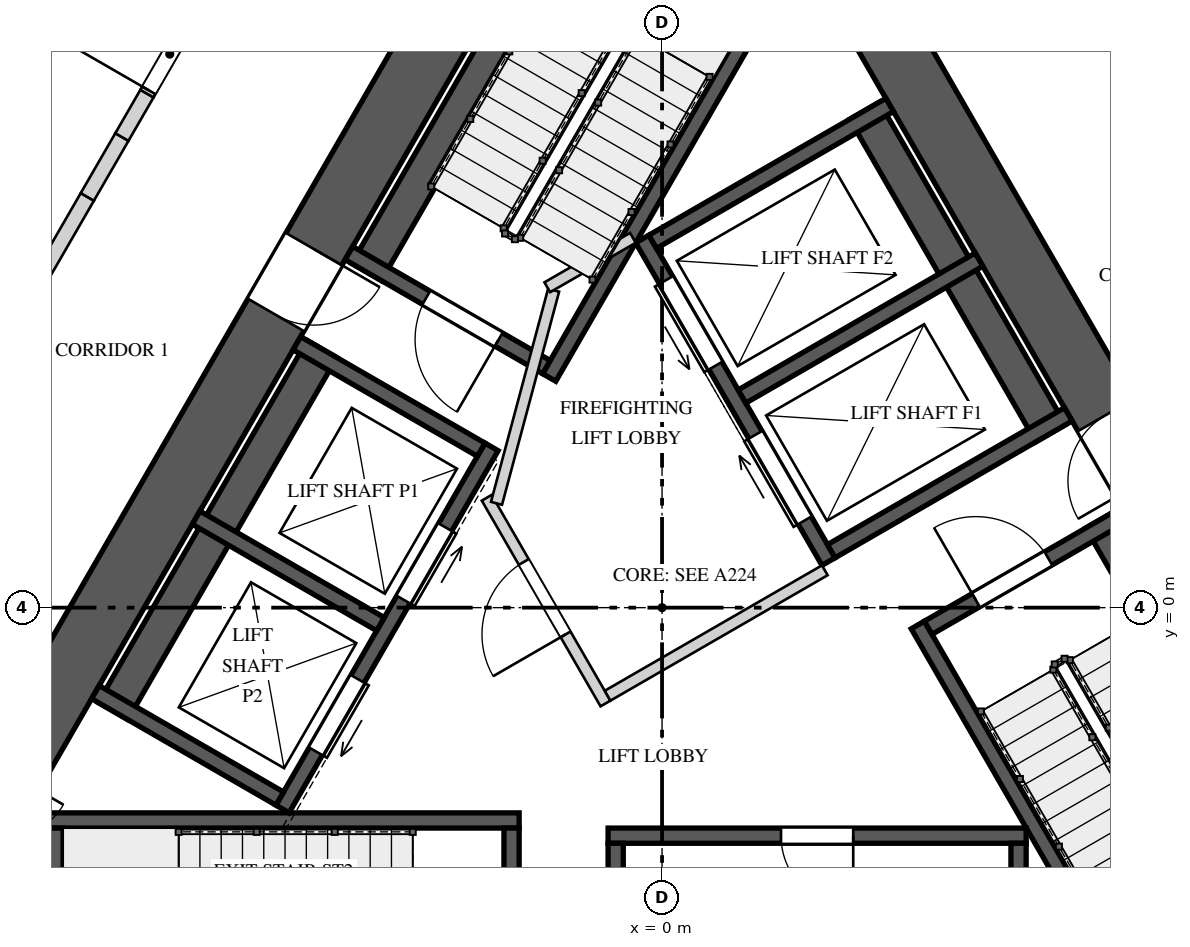
"""IFC4 building model, lengths in metres.
Left out: names, types, materials, properties, quantities, classifications, styles, units other than length and angle.
Written with IfcOpenShell. Run it as: python <this file> out.ifc"""

import sys

from ifc_helpers import new_model, si_unit, direction, frame, frame_2d, origin, place, context, subcontext, project, spatial, polyline, rectangle, outline, extrude, element, fill, save


model = new_model("IFC4")
c1 = context("Model", 3, precision=1e-05, world=origin(), true_north=direction((0.0, 1.0)))
c2 = subcontext(c1, "Body", "Model", "MODEL_VIEW")
j1 = project(units=[si_unit("LENGTHUNIT", "METRE"), si_unit("PLANEANGLEUNIT", "RADIAN")], contexts=[c1])
p1 = place(None, origin())
s1 = spatial("IfcSite", under=j1, at=p1, CompositionType="ELEMENT")
p2 = place(p1, origin())
s2 = spatial("IfcBuilding", under=s1, at=p2, CompositionType="ELEMENT")
p3 = place(p2, frame((0.0, 0.0, 162.8)))
s3 = spatial("IfcBuildingStorey", under=s2, at=p3, CompositionType="ELEMENT", Elevation=162.8)
p4 = place(p3, frame((-1.198, 10.575, 0.0), z_axis=(0.0, 0.0, 1.0), x_axis=(-0.499995289315, -0.866028123483, 0.0)))
e1 = element("IfcWall", 1, at=p4, inside=s3, PredefinedType="SHEAR", context=c2, shape_type="SweptSolid", body=[
    extrude(rectangle(XDim=17.118, YDim=0.85, at=frame_2d((8.559, 0.0))), origin(), (0.0, 0.0, 1.0), 4.0),
])
p5 = place(p4, frame((6.764, 0.0, 0.0)))
e2 = element("IfcOpeningElement", 2, at=p5, cuts=e1, PredefinedType="OPENING", context=c2, shape_type="SweptSolid", body=[
    extrude(rectangle(XDim=1.0, YDim=2.4, at=frame_2d((0.5, 1.2))), frame((0.0, 0.435, 0.0), z_axis=(0.0, -1.0, 0.0), x_axis=(1.0, 0.0, 0.0)), (0.0, 0.0, 1.0), 0.87),
])
p6 = place(p4, frame((14.742, 0.0, 0.0)))
e3 = element("IfcOpeningElement", 3, at=p6, cuts=e1, PredefinedType="OPENING", context=c2, shape_type="SweptSolid", body=[
    extrude(rectangle(XDim=0.8, YDim=2.1, at=frame_2d((0.4, 1.05))), frame((0.0, 0.435, 0.0), z_axis=(0.0, -1.0, 0.0), x_axis=(1.0, 0.0, 0.0)), (0.0, 0.0, 1.0), 0.87),
])
p7 = place(p3, frame((9.757, -4.25, 0.0), z_axis=(0.0, 0.0, 1.0), x_axis=(-0.499995289315, 0.866028123483, 0.0)))
e4 = element("IfcWall", 4, at=p7, inside=s3, PredefinedType="SHEAR", context=c2, shape_type="SweptSolid", body=[
    extrude(rectangle(XDim=17.118, YDim=0.85, at=frame_2d((8.559, 0.0))), origin(), (0.0, 0.0, 1.0), 4.0),
])
p8 = place(p7, frame((6.834, 0.0, 0.0)))
e5 = element("IfcOpeningElement", 5, at=p8, cuts=e4, PredefinedType="OPENING", context=c2, shape_type="SweptSolid", body=[
    extrude(rectangle(XDim=1.0, YDim=2.4, at=frame_2d((0.5, 1.2))), frame((0.0, 0.435, 0.0), z_axis=(0.0, -1.0, 0.0), x_axis=(1.0, 0.0, 0.0)), (0.0, 0.0, 1.0), 0.87),
])
p9 = place(p3, frame((-0.788, 9.785, 0.0), z_axis=(0.0, 0.0, 1.0), x_axis=(-0.500009909098, -0.866019682689, 0.0)))
e6 = element("IfcWall", 6, at=p9, inside=s3, PredefinedType="SOLIDWALL", context=c2, shape_type="SweptSolid", body=[
    extrude(rectangle(XDim=6.2, YDim=0.45, at=frame_2d((3.1, 0.0))), origin(), (0.0, 0.0, 1.0), 3.65),
])
p10 = place(p3, frame((1.79, 8.7, 0.0), z_axis=(0.0, 0.0, 1.0), x_axis=(-0.499999959354, -0.866025427251, 0.0)))
e7 = element("IfcWall", 7, at=p10, inside=s3, PredefinedType="SOLIDWALL", context=c2, shape_type="SweptSolid", body=[
    extrude(rectangle(XDim=6.549, YDim=0.2, at=frame_2d((3.275, 0.0))), origin(), (0.0, 0.0, 1.0), 3.65),
])
p11 = place(p3, frame((-1.521, 3.165, 0.0), z_axis=(0.0, 0.0, 1.0), x_axis=(-0.866031096941, 0.499990139034, 0.0)))
e8 = element("IfcWall", 8, at=p11, inside=s3, PredefinedType="SOLIDWALL", context=c2, shape_type="SweptSolid", body=[
    extrude(rectangle(XDim=3.0, YDim=0.2, at=frame_2d((1.5, 0.0))), origin(), (0.0, 0.0, 1.0), 3.65),
])
p12 = place(p11, frame((0.725, 0.0, 0.0)))
e9 = element("IfcOpeningElement", 9, at=p12, cuts=e8, PredefinedType="OPENING", context=c2, shape_type="SweptSolid", body=[
    extrude(rectangle(XDim=1.1, YDim=2.4, at=frame_2d((0.55, 1.2))), frame((0.0, 0.11, 0.0), z_axis=(0.0, -1.0, 0.0), x_axis=(1.0, 0.0, 0.0)), (0.0, 0.0, 1.0), 0.22),
])
p13 = place(p3, frame((-8.429, -2.8, 0.0), z_axis=(0.0, 0.0, 1.0), x_axis=(1.0, 0.0, 0.0)))
e10 = element("IfcWall", 10, at=p13, inside=s3, PredefinedType="SOLIDWALL", context=c2, shape_type="SweptSolid", body=[
    extrude(rectangle(XDim=6.549, YDim=0.2, at=frame_2d((3.275, 0.0))), origin(), (0.0, 0.0, 1.0), 3.65),
])
p14 = place(p3, frame((-7.98, -2.9, 0.0), z_axis=(0.0, 0.0, 1.0), x_axis=(0.0, -1.0, 0.0)))
e11 = element("IfcWall", 11, at=p14, inside=s3, PredefinedType="SOLIDWALL", context=c2, shape_type="SweptSolid", body=[
    extrude(rectangle(XDim=3.0, YDim=0.2, at=frame_2d((1.5, 0.0))), origin(), (0.0, 0.0, 1.0), 3.65),
])
p15 = place(p3, frame((-1.98, -2.9, 0.0), z_axis=(0.0, 0.0, 1.0), x_axis=(0.0, -1.0, 0.0)))
e12 = element("IfcWall", 12, at=p15, inside=s3, PredefinedType="SOLIDWALL", context=c2, shape_type="SweptSolid", body=[
    extrude(rectangle(XDim=3.0, YDim=0.2, at=frame_2d((1.5, 0.0))), origin(), (0.0, 0.0, 1.0), 3.65),
])
p16 = place(p15, frame((0.725, 0.0, 0.0)))
e13 = element("IfcOpeningElement", 13, at=p16, cuts=e12, PredefinedType="OPENING", context=c2, shape_type="SweptSolid", body=[
    extrude(rectangle(XDim=1.1, YDim=2.4, at=frame_2d((0.55, 1.2))), frame((0.0, 0.11, 0.0), z_axis=(0.0, -1.0, 0.0), x_axis=(1.0, 0.0, 0.0)), (0.0, 0.0, 1.0), 0.22),
])
p17 = place(p3, frame((8.868, -4.21, 0.0), z_axis=(0.0, 0.0, 1.0), x_axis=(-0.500009909098, 0.866019682689, 0.0)))
e14 = element("IfcWall", 14, at=p17, inside=s3, PredefinedType="SOLIDWALL", context=c2, shape_type="SweptSolid", body=[
    extrude(rectangle(XDim=6.2, YDim=0.45, at=frame_2d((3.1, 0.0))), origin(), (0.0, 0.0, 1.0), 3.65),
])
p18 = place(p3, frame((6.64, -5.9, 0.0), z_axis=(0.0, 0.0, 1.0), x_axis=(-0.499999959354, 0.866025427251, 0.0)))
e15 = element("IfcWall", 15, at=p18, inside=s3, PredefinedType="SOLIDWALL", context=c2, shape_type="SweptSolid", body=[
    extrude(rectangle(XDim=6.549, YDim=0.2, at=frame_2d((3.275, 0.0))), origin(), (0.0, 0.0, 1.0), 3.65),
])
p19 = place(p3, frame((3.501, -0.265, 0.0), z_axis=(0.0, 0.0, 1.0), x_axis=(0.866031096941, 0.499990139034, 0.0)))
e16 = element("IfcWall", 16, at=p19, inside=s3, PredefinedType="SOLIDWALL", context=c2, shape_type="SweptSolid", body=[
    extrude(rectangle(XDim=3.0, YDim=0.2, at=frame_2d((1.5, 0.0))), origin(), (0.0, 0.0, 1.0), 3.65),
])
p20 = place(p19, frame((0.725, 0.0, 0.0)))
e17 = element("IfcOpeningElement", 17, at=p20, cuts=e16, PredefinedType="OPENING", context=c2, shape_type="SweptSolid", body=[
    extrude(rectangle(XDim=1.1, YDim=2.4, at=frame_2d((0.55, 1.2))), frame((0.0, 0.11, 0.0), z_axis=(0.0, -1.0, 0.0), x_axis=(1.0, 0.0, 0.0)), (0.0, 0.0, 1.0), 0.22),
])
p21 = place(p3, frame((-2.243, 2.115, 0.0), z_axis=(0.0, 0.0, 1.0), x_axis=(-0.499996545922, -0.866027397988, 0.0)))
e18 = element("IfcWall", 18, at=p21, inside=s3, PredefinedType="SOLIDWALL", context=c2, shape_type="SweptSolid", body=[
    extrude(rectangle(XDim=5.5, YDim=0.2, at=frame_2d((2.75, 0.0))), origin(), (0.0, 0.0, 1.0), 3.65),
])
p22 = place(p21, frame((1.22, 0.0, 0.0)))
e19 = element("IfcOpeningElement", 19, at=p22, cuts=e18, PredefinedType="OPENING", context=c2, shape_type="SweptSolid", body=[
    extrude(rectangle(XDim=1.1, YDim=2.1, at=frame_2d((0.55, 1.05))), frame((0.0, 0.11, 0.0), z_axis=(0.0, -1.0, 0.0), x_axis=(1.0, 0.0, 0.0)), (0.0, 0.0, 1.0), 0.22),
])
p23 = place(p21, frame((3.525, 0.0, 0.0)))
e20 = element("IfcOpeningElement", 20, at=p23, cuts=e18, PredefinedType="OPENING", context=c2, shape_type="SweptSolid", body=[
    extrude(rectangle(XDim=1.1, YDim=2.1, at=frame_2d((0.55, 1.05))), frame((0.0, 0.11, 0.0), z_axis=(0.0, -1.0, 0.0), x_axis=(1.0, 0.0, 0.0)), (0.0, 0.0, 1.0), 0.22),
])
p24 = place(p3, frame((-4.473, 3.402, 0.0), z_axis=(0.0, 0.0, 1.0), x_axis=(-0.499996545922, -0.866027397988, 0.0)))
e21 = element("IfcWall", 21, at=p24, inside=s3, PredefinedType="SOLIDWALL", context=c2, shape_type="SweptSolid", body=[
    extrude(rectangle(XDim=5.5, YDim=0.45, at=frame_2d((2.75, 0.0))), origin(), (0.0, 0.0, 1.0), 3.65),
])
p25 = place(p3, frame((-2.38, 2.078, 0.0), z_axis=(0.0, 0.0, 1.0), x_axis=(-0.866034573852, 0.49998411664, 0.0)))
e22 = element("IfcWall", 22, at=p25, inside=s3, PredefinedType="SOLIDWALL", context=c2, shape_type="SweptSolid", body=[
    extrude(rectangle(XDim=2.8, YDim=0.2, at=frame_2d((1.4, 0.0))), origin(), (0.0, 0.0, 1.0), 3.65),
])
p26 = place(p3, frame((-3.705, -0.217, 0.0), z_axis=(0.0, 0.0, 1.0), x_axis=(-0.866018616679, 0.500011755427, 0.0)))
e23 = element("IfcWall", 23, at=p26, inside=s3, PredefinedType="SOLIDWALL", context=c2, shape_type="SweptSolid", body=[
    extrude(rectangle(XDim=2.8, YDim=0.2, at=frame_2d((1.4, 0.0))), origin(), (0.0, 0.0, 1.0), 3.65),
])
p27 = place(p3, frame((-5.03, -2.512, 0.0), z_axis=(0.0, 0.0, 1.0), x_axis=(-0.865996816683, 0.500049511043, 0.0)))
e24 = element("IfcWall", 24, at=p27, inside=s3, PredefinedType="SOLIDWALL", context=c2, shape_type="SweptSolid", body=[
    extrude(rectangle(XDim=2.8, YDim=0.2, at=frame_2d((1.4, 0.0))), origin(), (0.0, 0.0, 1.0), 3.65),
])
p28 = place(p3, frame((4.79, -3.0, 0.0), z_axis=(0.0, 0.0, 1.0), x_axis=(-1.0, 0.0, 0.0)))
e25 = element("IfcWall", 25, at=p28, inside=s3, PredefinedType="SOLIDWALL", context=c2, shape_type="SweptSolid", body=[
    extrude(rectangle(XDim=5.5, YDim=0.2, at=frame_2d((2.75, 0.0))), origin(), (0.0, 0.0, 1.0), 3.65),
])
p29 = place(p28, frame((2.275, 0.0, 0.0)))
e26 = element("IfcOpeningElement", 26, at=p29, cuts=e25, PredefinedType="OPENING", context=c2, shape_type="SweptSolid", body=[
    extrude(rectangle(XDim=0.95, YDim=2.4, at=frame_2d((0.475, 1.2))), frame((0.0, 0.11, 0.0), z_axis=(0.0, -1.0, 0.0), x_axis=(1.0, 0.0, 0.0)), (0.0, 0.0, 1.0), 0.22),
])
for number, where, z_axis, x_axis in (
    (27, (-0.61, -3.1, 0.0), (0.0, 0.0, 1.0), (0.0, -1.0, 0.0)),
    (28, (4.69, -3.1, 0.0), (0.0, 0.0, 1.0), (0.0, -1.0, 0.0)),
):
    element("IfcWall", number, at=place(p3, frame(where, z_axis=z_axis, x_axis=x_axis)), inside=s3, PredefinedType="SOLIDWALL", context=c2, shape_type="SweptSolid", body=[
        extrude(rectangle(XDim=2.8, YDim=0.2, at=frame_2d((1.4, 0.0))), origin(), (0.0, 0.0, 1.0), 3.65),
    ])
p30 = place(p3, frame((2.19, 0.606, 0.0), z_axis=(0.0, 0.0, 1.0), x_axis=(-0.500002801628, 0.866023786258, 0.0)))
e29 = element("IfcWall", 29, at=p30, inside=s3, PredefinedType="SOLIDWALL", context=c2, shape_type="SweptSolid", body=[
    extrude(rectangle(XDim=4.9, YDim=0.2, at=frame_2d((2.45, 0.0))), origin(), (0.0, 0.0, 1.0), 3.65),
])
p31 = place(p30, frame((0.625, 0.0, 0.0)))
e30 = element("IfcOpeningElement", 30, at=p31, cuts=e29, PredefinedType="OPENING", context=c2, shape_type="SweptSolid", body=[
    extrude(rectangle(XDim=1.3, YDim=2.1, at=frame_2d((0.65, 1.05))), frame((0.0, 0.11, 0.0), z_axis=(0.0, -1.0, 0.0), x_axis=(1.0, 0.0, 0.0)), (0.0, 0.0, 1.0), 0.22),
])
p32 = place(p30, frame((2.975, 0.0, 0.0)))
e31 = element("IfcOpeningElement", 31, at=p32, cuts=e29, PredefinedType="OPENING", context=c2, shape_type="SweptSolid", body=[
    extrude(rectangle(XDim=1.3, YDim=2.1, at=frame_2d((0.65, 1.05))), frame((0.0, 0.11, 0.0), z_axis=(0.0, -1.0, 0.0), x_axis=(1.0, 0.0, 0.0)), (0.0, 0.0, 1.0), 0.22),
])
p33 = place(p3, frame((5.113, 2.294, 0.0), z_axis=(0.0, 0.0, 1.0), x_axis=(-0.500002801628, 0.866023786258, 0.0)))
e32 = element("IfcWall", 32, at=p33, inside=s3, PredefinedType="SOLIDWALL", context=c2, shape_type="SweptSolid", body=[
    extrude(rectangle(XDim=4.9, YDim=0.45, at=frame_2d((2.45, 0.0))), origin(), (0.0, 0.0, 1.0), 3.65),
])
for number, where, z_axis, x_axis in (
    (33, (2.227, 0.743, 0.0), (0.0, 0.0, 1.0), (0.866, 0.5, 0.0)),
    (34, (1.052, 2.778, 0.0), (0.0, 0.0, 1.0), (0.866, 0.5, 0.0)),
    (35, (-0.123, 4.813, 0.0), (0.0, 0.0, 1.0), (0.866, 0.5, 0.0)),
):
    element("IfcWall", number, at=place(p3, frame(where, z_axis=z_axis, x_axis=x_axis)), inside=s3, PredefinedType="SOLIDWALL", context=c2, shape_type="SweptSolid", body=[
        extrude(rectangle(XDim=3.6, YDim=0.2, at=frame_2d((1.8, 0.0))), origin(), (0.0, 0.0, 1.0), 3.65),
    ])
p34 = place(p3, frame((-0.744, -1.261, 0.0), z_axis=(0.0, 0.0, 1.0), x_axis=(-0.500004234368, 0.866022959057, 0.0)))
e36 = element("IfcWall", 36, at=p34, inside=s3, PredefinedType="PARTITIONING", context=c2, shape_type="SweptSolid", body=[
    extrude(rectangle(XDim=3.125, YDim=0.15, at=frame_2d((1.562, 0.0))), origin(), (0.0, 0.0, 1.0), 3.65),
])
p35 = place(p34, frame((1.05, 0.0, 0.0)))
e37 = element("IfcOpeningElement", 37, at=p35, cuts=e36, PredefinedType="OPENING", context=c2, shape_type="SweptSolid", body=[
    extrude(rectangle(XDim=1.1, YDim=2.4, at=frame_2d((0.55, 1.2))), frame((0.0, 0.085, 0.0), z_axis=(0.0, -1.0, 0.0), x_axis=(1.0, 0.0, 0.0)), (0.0, 0.0, 1.0), 0.17),
])
p36 = place(p3, frame((-0.717, -1.159, 0.0), z_axis=(0.0, 0.0, 1.0), x_axis=(0.866008176907, 0.50002983664, 0.0)))
e38 = element("IfcWall", 38, at=p36, inside=s3, PredefinedType="PARTITIONING", context=c2, shape_type="SweptSolid", body=[
    extrude(rectangle(XDim=3.3, YDim=0.15, at=frame_2d((1.65, 0.0))), origin(), (0.0, 0.0, 1.0), 3.65),
])
p37 = place(p3, frame((-2.178, 1.372, 0.0), z_axis=(0.0, 0.0, 1.0), x_axis=(0.258808958833, 0.96592852884, 0.0)))
e39 = element("IfcWall", 39, at=p37, inside=s3, PredefinedType="PARTITIONING", context=c2, shape_type="SweptSolid", body=[
    extrude(rectangle(XDim=2.903, YDim=0.15, at=frame_2d((1.451, 0.0))), origin(), (0.0, 0.0, 1.0), 3.65),
])
p38 = place(p3, frame((-1.51, 4.215, 0.0), z_axis=(0.0, 0.0, 1.0), x_axis=(0.866085525409, 0.49989585183, 0.0)))
e40 = element("IfcWall", 40, at=p38, inside=s3, PredefinedType="PARTITIONING", context=c2, shape_type="SweptSolid", body=[
    extrude(rectangle(XDim=1.3, YDim=0.15, at=frame_2d((0.65, 0.0))), origin(), (0.0, 0.0, 1.0), 3.65),
])
p39 = place(p3, frame((4.867, 10.071, 0.0), z_axis=(0.0, 0.0, 1.0), x_axis=(0.499992344383, -0.866029823712, 0.0)))
e41 = element("IfcWall", 41, at=p39, inside=s3, PredefinedType="SOLIDWALL", context=c2, shape_type="SweptSolid", body=[
    extrude(rectangle(XDim=4.307, YDim=0.2, at=frame_2d((2.153, 0.0))), origin(), (0.0, 0.0, 1.0), 3.65),
])
p40 = place(p3, frame((-8.646, 3.525, 0.0), z_axis=(0.0, 0.0, 1.0), x_axis=(0.499975720793, 0.866039420937, 0.0)))
e42 = element("IfcWall", 42, at=p40, inside=s3, PredefinedType="SOLIDWALL", context=c2, shape_type="SweptSolid", body=[
    extrude(rectangle(XDim=2.169, YDim=0.2, at=frame_2d((1.085, 0.0))), origin(), (0.0, 0.0, 1.0), 3.65),
])
p41 = place(p3, frame((-7.561, 5.404, 0.0), z_axis=(0.0, 0.0, 1.0), x_axis=(0.499977996243, 0.866038107287, 0.0)))
e43 = element("IfcWall", 43, at=p41, inside=s3, PredefinedType="SOLIDWALL", context=c2, shape_type="SweptSolid", body=[
    extrude(rectangle(XDim=0.91, YDim=0.2, at=frame_2d((0.455, 0.0))), origin(), (0.0, 0.0, 1.0), 2.55),
])
p42 = place(p3, frame((-7.106, 6.191, 0.0), z_axis=(0.0, 0.0, 1.0), x_axis=(0.500160401961, 0.865932775861, 0.0)))
e44 = element("IfcWall", 44, at=p42, inside=s3, PredefinedType="SOLIDWALL", context=c2, shape_type="SweptSolid", body=[
    extrude(rectangle(XDim=0.659, YDim=0.2, at=frame_2d((0.33, 0.0))), origin(), (0.0, 0.0, 1.0), 3.65),
])
p43 = place(p3, frame((-6.777, 6.762, 0.0), z_axis=(0.0, 0.0, 1.0), x_axis=(0.499977039259, 0.866038659768, 0.0)))
e45 = element("IfcWall", 45, at=p43, inside=s3, PredefinedType="SOLIDWALL", context=c2, shape_type="SweptSolid", body=[
    extrude(outline(polyline([(0.0, 0.0), (1.245, 0.0), (1.245, 2.55), (0.292, 2.55), (0.292, 3.65), (0.0, 3.65), (0.0, 0.0)])), frame((0.0, 0.1, 0.0), z_axis=(0.0, -1.0, 0.0), x_axis=(1.0, 0.0, 0.0)), (0.0, 0.0, 1.0), 0.2),
])
p44 = place(p43, frame((0.05, 0.0, 0.0)))
e46 = element("IfcOpeningElement", 46, at=p44, cuts=e45, PredefinedType="OPENING", context=c2, shape_type="SweptSolid", body=[
    extrude(rectangle(XDim=1.1, YDim=2.4, at=frame_2d((0.55, 1.2))), frame((0.0, 0.11, 0.0), z_axis=(0.0, -1.0, 0.0), x_axis=(1.0, 0.0, 0.0)), (0.0, 0.0, 1.0), 0.22),
])
p45 = place(p12, origin())
e47 = element("IfcDoor", 47, at=p45, inside=s3, OperationType="SINGLE_SWING_RIGHT", PredefinedType="DOOR", context=c2, shape_type="SweptSolid", body=[
    extrude(rectangle(XDim=1.1, YDim=2.4, at=frame_2d((0.55, 1.2))), frame((0.0, 0.025, 0.0), z_axis=(0.0, -1.0, 0.0), x_axis=(1.0, 0.0, 0.0)), (0.0, 0.0, 1.0), 0.05),
])
fill(e9, e47)
p46 = place(p20, origin())
e48 = element("IfcDoor", 48, at=p46, inside=s3, OperationType="SINGLE_SWING_RIGHT", PredefinedType="DOOR", context=c2, shape_type="SweptSolid", body=[
    extrude(rectangle(XDim=1.1, YDim=2.4, at=frame_2d((0.55, 1.2))), frame((0.0, 0.025, 0.0), z_axis=(0.0, -1.0, 0.0), x_axis=(1.0, 0.0, 0.0)), (0.0, 0.0, 1.0), 0.05),
])
fill(e17, e48)
p47 = place(p22, origin())
e49 = element("IfcDoor", 49, at=p47, inside=s3, OperationType="SLIDING_TO_LEFT", PredefinedType="DOOR", context=c2, shape_type="SweptSolid", body=[
    extrude(rectangle(XDim=1.1, YDim=2.1, at=frame_2d((0.55, 1.05))), frame((0.0, 0.025, 0.0), z_axis=(0.0, -1.0, 0.0), x_axis=(1.0, 0.0, 0.0)), (0.0, 0.0, 1.0), 0.05),
])
fill(e19, e49)
p48 = place(p23, origin())
e50 = element("IfcDoor", 50, at=p48, inside=s3, OperationType="SLIDING_TO_RIGHT", PredefinedType="DOOR", context=c2, shape_type="SweptSolid", body=[
    extrude(rectangle(XDim=1.1, YDim=2.1, at=frame_2d((0.55, 1.05))), frame((0.0, 0.025, 0.0), z_axis=(0.0, -1.0, 0.0), x_axis=(1.0, 0.0, 0.0)), (0.0, 0.0, 1.0), 0.05),
])
fill(e20, e50)
p49 = place(p29, origin())
e51 = element("IfcDoor", 51, at=p49, inside=s3, OperationType="SINGLE_SWING_LEFT", PredefinedType="DOOR", context=c2, shape_type="SweptSolid", body=[
    extrude(rectangle(XDim=0.95, YDim=2.4, at=frame_2d((0.475, 1.2))), frame((0.0, 0.025, 0.0), z_axis=(0.0, -1.0, 0.0), x_axis=(1.0, 0.0, 0.0)), (0.0, 0.0, 1.0), 0.05),
])
fill(e26, e51)
p50 = place(p31, origin())
e52 = element("IfcDoor", 52, at=p50, inside=s3, OperationType="SLIDING_TO_RIGHT", PredefinedType="DOOR", context=c2, shape_type="SweptSolid", body=[
    extrude(rectangle(XDim=1.3, YDim=2.1, at=frame_2d((0.65, 1.05))), frame((0.0, 0.025, 0.0), z_axis=(0.0, -1.0, 0.0), x_axis=(1.0, 0.0, 0.0)), (0.0, 0.0, 1.0), 0.05),
])
fill(e30, e52)
p51 = place(p32, origin())
e53 = element("IfcDoor", 53, at=p51, inside=s3, OperationType="SLIDING_TO_LEFT", PredefinedType="DOOR", context=c2, shape_type="SweptSolid", body=[
    extrude(rectangle(XDim=1.3, YDim=2.1, at=frame_2d((0.65, 1.05))), frame((0.0, 0.025, 0.0), z_axis=(0.0, -1.0, 0.0), x_axis=(1.0, 0.0, 0.0)), (0.0, 0.0, 1.0), 0.05),
])
fill(e31, e53)
p52 = place(p35, origin())
e54 = element("IfcDoor", 54, at=p52, inside=s3, OperationType="SINGLE_SWING_RIGHT", PredefinedType="DOOR", context=c2, shape_type="SweptSolid", body=[
    extrude(rectangle(XDim=1.1, YDim=2.4, at=frame_2d((0.55, 1.2))), frame((0.0, 0.025, 0.0), z_axis=(0.0, -1.0, 0.0), x_axis=(1.0, 0.0, 0.0)), (0.0, 0.0, 1.0), 0.05),
])
fill(e37, e54)
p53 = place(p5, origin())
e55 = element("IfcDoor", 55, at=p53, inside=s3, OperationType="SINGLE_SWING_LEFT", PredefinedType="DOOR", context=c2, shape_type="SweptSolid", body=[
    extrude(rectangle(XDim=1.0, YDim=2.4, at=frame_2d((0.5, 1.2))), frame((0.0, 0.025, 0.0), z_axis=(0.0, -1.0, 0.0), x_axis=(1.0, 0.0, 0.0)), (0.0, 0.0, 1.0), 0.05),
])
fill(e2, e55)
p54 = place(p8, origin())
e56 = element("IfcDoor", 56, at=p54, inside=s3, OperationType="SINGLE_SWING_LEFT", PredefinedType="DOOR", context=c2, shape_type="SweptSolid", body=[
    extrude(rectangle(XDim=1.0, YDim=2.4, at=frame_2d((0.5, 1.2))), frame((0.0, 0.025, 0.0), z_axis=(0.0, -1.0, 0.0), x_axis=(1.0, 0.0, 0.0)), (0.0, 0.0, 1.0), 0.05),
])
fill(e5, e56)
p55 = place(p44, origin())
e57 = element("IfcDoor", 57, at=p55, inside=s3, OperationType="SINGLE_SWING_RIGHT", PredefinedType="DOOR", context=c2, shape_type="SweptSolid", body=[
    extrude(rectangle(XDim=1.1, YDim=2.4, at=frame_2d((0.55, 1.2))), frame((0.0, 0.025, 0.0), z_axis=(0.0, -1.0, 0.0), x_axis=(1.0, 0.0, 0.0)), (0.0, 0.0, 1.0), 0.05),
])
fill(e46, e57)
save(model, sys.argv[1])
